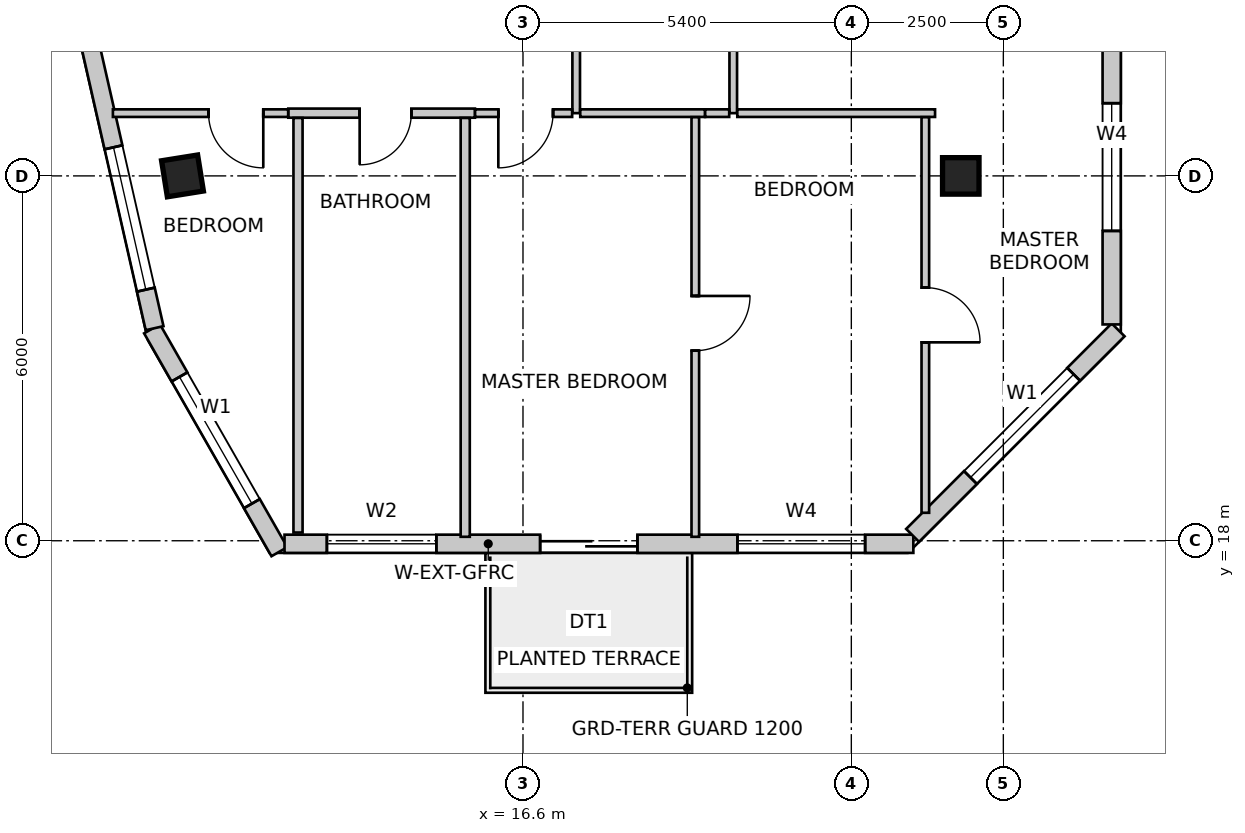
"""IFC4 building model, lengths in metres.
Left out: names, types, materials, properties, quantities, classifications, styles, units other than length and angle.
Written with IfcOpenShell. Run it as: python <this file> out.ifc"""

import sys

from ifc_helpers import new_model, si_unit, direction, frame, frame_2d, origin, origin_2d, place, context, subcontext, project, spatial, rectangle, extrude, source, transform, mapped, element, fill, save


model = new_model("IFC4")
c1 = context("Model", 3, precision=1e-05, world=origin(), true_north=direction((0.0, 1.0)))
c2 = subcontext(c1, "Body", "Model", "MODEL_VIEW")
j1 = project(units=[si_unit("LENGTHUNIT", "METRE"), si_unit("PLANEANGLEUNIT", "RADIAN")], contexts=[c1])
p1 = place(None, origin())
s1 = spatial("IfcSite", under=j1, at=p1, CompositionType="ELEMENT")
p2 = place(p1, origin())
s2 = spatial("IfcBuilding", under=s1, at=p2, CompositionType="ELEMENT")
p3 = place(p2, frame((0.0, 0.0, 256.5)))
s3 = spatial("IfcBuildingStorey", under=s2, at=p3, CompositionType="ELEMENT", Elevation=256.5)
m1 = source(origin(), c2, "Body", "SweptSolid", [
    extrude(rectangle(XDim=0.6, YDim=0.6, at=origin_2d()), origin(), (0.0, 0.0, 1.0), 3.6),
])
for number, where, z_axis, x_axis in (
    (1, (11.0, 24.0, 0.0), (0.0, 0.0, 1.0), (0.158, -0.987, 0.0)),
    (2, (23.8, 24.0, 0.0), (0.0, 0.0, 1.0), (1.0, 0.0, 0.0)),
):
    element("IfcColumn", number, at=place(p3, frame(where, z_axis=z_axis, x_axis=x_axis)), inside=s3, PredefinedType="COLUMN", context=c2, shape_type="MappedRepresentation", body=[
        mapped(m1, transform((0.0, 0.0, 0.0), scale=1.0)),
    ])
p4 = place(p3, frame((10.499, 21.485, 0.0), z_axis=(0.0, 0.0, 1.0), x_axis=(0.496163848656, -0.868228907194, 0.0)))
e3 = element("IfcWall", 3, at=p4, inside=s3, PredefinedType="SOLIDWALL", context=c2, shape_type="SweptSolid", body=[
    extrude(rectangle(XDim=4.222, YDim=0.3, at=frame_2d((2.111, 0.0))), origin(), (0.0, 0.0, 1.0), 3.35),
])
m2 = source(origin(), c2, "Body", "SweptSolid", [
    extrude(rectangle(XDim=2.4, YDim=2.2, at=frame_2d((1.2, 1.1))), frame((0.0, 0.16, 0.0), z_axis=(0.0, -1.0, 0.0), x_axis=(1.0, 0.0, 0.0)), (0.0, 0.0, 1.0), 0.32),
])
p5 = place(p4, frame((0.911, 0.0, 0.85)))
e4 = element("IfcOpeningElement", 4, at=p5, cuts=e3, PredefinedType="OPENING", context=c2, shape_type="MappedRepresentation", body=[
    mapped(m2, transform((0.0, 0.0, 0.0), scale=1.0)),
])
p6 = place(p3, frame((12.678, 17.95, 0.0), z_axis=(0.0, 0.0, 1.0), x_axis=(1.0, 0.0, 0.0)))
e5 = element("IfcWall", 5, at=p6, inside=s3, PredefinedType="SOLIDWALL", context=c2, shape_type="SweptSolid", body=[
    extrude(rectangle(XDim=10.342, YDim=0.3, at=frame_2d((5.171, 0.0))), origin(), (0.0, 0.0, 1.0), 3.35),
])
m3 = source(origin(), c2, "Body", "SweptSolid", [
    extrude(rectangle(XDim=1.6, YDim=2.15, at=frame_2d((0.8, 1.075))), frame((0.0, 0.16, 0.0), z_axis=(0.0, -1.0, 0.0), x_axis=(1.0, 0.0, 0.0)), (0.0, 0.0, 1.0), 0.32),
])
p7 = place(p6, frame((4.204, 0.0, 0.0)))
e6 = element("IfcOpeningElement", 6, at=p7, cuts=e5, PredefinedType="OPENING", context=c2, shape_type="MappedRepresentation", body=[
    mapped(m3, transform((0.0, 0.0, 0.0), scale=1.0)),
])
m4 = source(origin(), c2, "Body", "SweptSolid", [
    extrude(rectangle(XDim=1.8, YDim=2.1, at=frame_2d((0.9, 1.05))), frame((0.0, 0.16, 0.0), z_axis=(0.0, -1.0, 0.0), x_axis=(1.0, 0.0, 0.0)), (0.0, 0.0, 1.0), 0.32),
])
p8 = place(p6, frame((0.697, 0.0, 0.85)))
e7 = element("IfcOpeningElement", 7, at=p8, cuts=e5, PredefinedType="OPENING", context=c2, shape_type="MappedRepresentation", body=[
    mapped(m4, transform((0.0, 0.0, 0.0), scale=1.0)),
])
m5 = source(origin(), c2, "Body", "SweptSolid", [
    extrude(rectangle(XDim=2.1, YDim=2.0, at=frame_2d((1.05, 1.0))), frame((0.0, 0.16, 0.0), z_axis=(0.0, -1.0, 0.0), x_axis=(1.0, 0.0, 0.0)), (0.0, 0.0, 1.0), 0.32),
])
p9 = place(p6, frame((7.449, 0.0, 0.85)))
e8 = element("IfcOpeningElement", 8, at=p9, cuts=e5, PredefinedType="OPENING", context=c2, shape_type="MappedRepresentation", body=[
    mapped(m5, transform((0.0, 0.0, 0.0), scale=1.0)),
])
p10 = place(p3, frame((23.008, 18.088, 0.0), z_axis=(0.0, 0.0, 1.0), x_axis=(0.707106781187, 0.707106781187, 0.0)))
e9 = element("IfcWall", 9, at=p10, inside=s3, PredefinedType="SOLIDWALL", context=c2, shape_type="SweptSolid", body=[
    extrude(rectangle(XDim=4.781, YDim=0.3, at=frame_2d((2.39, 0.0))), origin(), (0.0, 0.0, 1.0), 3.35),
])
p11 = place(p10, frame((1.346, 0.0, 0.85)))
e10 = element("IfcOpeningElement", 10, at=p11, cuts=e9, PredefinedType="OPENING", context=c2, shape_type="MappedRepresentation", body=[
    mapped(m2, transform((0.0, 0.0, 0.0), scale=1.0)),
])
p12 = place(p3, frame((26.282, 21.557, 0.0), z_axis=(0.0, 0.0, 1.0), x_axis=(0.0, 1.0, 0.0)))
e11 = element("IfcWall", 11, at=p12, inside=s3, PredefinedType="SOLIDWALL", context=c2, shape_type="SweptSolid", body=[
    extrude(rectangle(XDim=9.711, YDim=0.3, at=frame_2d((4.855, 0.0))), origin(), (0.0, 0.0, 1.0), 3.35),
])
p13 = place(p12, frame((1.538, 0.0, 0.85)))
e12 = element("IfcOpeningElement", 12, at=p13, cuts=e11, PredefinedType="OPENING", context=c2, shape_type="MappedRepresentation", body=[
    mapped(m5, transform((0.0, 0.0, 0.0), scale=1.0)),
])
p14 = place(p12, frame((5.923, 0.0, 0.85)))
e13 = element("IfcOpeningElement", 13, at=p14, cuts=e11, PredefinedType="OPENING", context=c2, shape_type="MappedRepresentation", body=[
    mapped(m2, transform((0.0, 0.0, 0.0), scale=1.0)),
])
p15 = place(p3, frame((8.191, 31.834, 0.0), z_axis=(0.0, 0.0, 1.0), x_axis=(0.221636032737, -0.975129462683, 0.0)))
e14 = element("IfcWall", 14, at=p15, inside=s3, PredefinedType="SOLIDWALL", context=c2, shape_type="SweptSolid", body=[
    extrude(rectangle(XDim=10.602, YDim=0.3, at=frame_2d((5.301, 0.0))), origin(), (0.0, 0.0, 1.0), 3.35),
])
p16 = place(p15, frame((2.351, 0.0, 0.85)))
e15 = element("IfcOpeningElement", 15, at=p16, cuts=e14, PredefinedType="OPENING", context=c2, shape_type="MappedRepresentation", body=[
    mapped(m2, transform((0.0, 0.0, 0.0), scale=1.0)),
])
p17 = place(p15, frame((7.552, 0.0, 0.85)))
e16 = element("IfcOpeningElement", 16, at=p17, cuts=e14, PredefinedType="OPENING", context=c2, shape_type="MappedRepresentation", body=[
    mapped(m2, transform((0.0, 0.0, 0.0), scale=1.0)),
])
p18 = place(p3, frame((20.058, 25.032, 0.0), z_axis=(0.0, 0.0, 1.0), x_axis=(0.0, 1.0, 0.0)))
e17 = element("IfcWall", 17, at=p18, inside=s3, PredefinedType="PARTITIONING", context=c2, shape_type="SweptSolid", body=[
    extrude(rectangle(XDim=6.874, YDim=0.125, at=frame_2d((3.437, 0.0))), origin(), (0.0, 0.0, 1.0), 2.922),
])
m6 = source(origin(), c2, "Body", "SweptSolid", [
    extrude(rectangle(XDim=0.9, YDim=2.15, at=frame_2d((0.45, 1.075))), frame((0.0, 0.073, 0.0), z_axis=(0.0, -1.0, 0.0), x_axis=(1.0, 0.0, 0.0)), (0.0, 0.0, 1.0), 0.145),
])
p19 = place(p18, frame((2.927, 0.0, 0.0)))
e18 = element("IfcOpeningElement", 18, at=p19, cuts=e17, PredefinedType="OPENING", context=c2, shape_type="MappedRepresentation", body=[
    mapped(m6, transform((0.0, 0.0, 0.0), scale=1.0)),
])
p20 = place(p3, frame((23.377, 25.032, 0.0), z_axis=(0.0, 0.0, 1.0), x_axis=(-1.0, 0.0, 0.0)))
e19 = element("IfcWall", 19, at=p20, inside=s3, PredefinedType="PARTITIONING", context=c2, shape_type="SweptSolid", body=[
    extrude(rectangle(XDim=3.252, YDim=0.125, at=frame_2d((1.626, 0.0))), origin(), (0.0, 0.0, 1.0), 3.034),
])
p21 = place(p3, frame((17.475, 31.906, 0.0), z_axis=(0.0, 0.0, 1.0), x_axis=(0.0, -1.0, 0.0)))
e20 = element("IfcWall", 20, at=p21, inside=s3, PredefinedType="PARTITIONING", context=c2, shape_type="SweptSolid", body=[
    extrude(rectangle(XDim=6.874, YDim=0.125, at=frame_2d((3.437, 0.0))), origin(), (0.0, 0.0, 1.0), 2.922),
])
m7 = source(origin(), c2, "Body", "SweptSolid", [
    extrude(rectangle(XDim=0.85, YDim=2.15, at=frame_2d((0.425, 1.075))), frame((0.0, 0.073, 0.0), z_axis=(0.0, -1.0, 0.0), x_axis=(1.0, 0.0, 0.0)), (0.0, 0.0, 1.0), 0.145),
])
p22 = place(p21, frame((3.073, 0.0, 0.0)))
e21 = element("IfcOpeningElement", 21, at=p22, cuts=e20, PredefinedType="OPENING", context=c2, shape_type="MappedRepresentation", body=[
    mapped(m7, transform((0.0, 0.0, 0.0), scale=1.0)),
])
p23 = place(p3, frame((15.81, 25.032, 0.0), z_axis=(0.0, 0.0, 1.0), x_axis=(-1.0, 0.0, 0.0)))
e22 = element("IfcWall", 22, at=p23, inside=s3, PredefinedType="PARTITIONING", context=c2, shape_type="SweptSolid", body=[
    extrude(rectangle(XDim=3.07, YDim=0.15, at=frame_2d((1.535, 0.0))), origin(), (0.0, 0.0, 1.0), 2.922),
])
m8 = source(origin(), c2, "Body", "SweptSolid", [
    extrude(rectangle(XDim=0.85, YDim=2.15, at=frame_2d((0.425, 1.075))), frame((0.0, 0.085, 0.0), z_axis=(0.0, -1.0, 0.0), x_axis=(1.0, 0.0, 0.0)), (0.0, 0.0, 1.0), 0.17),
])
p24 = place(p23, frame((1.046, 0.0, 0.0)))
e23 = element("IfcOpeningElement", 23, at=p24, cuts=e22, PredefinedType="OPENING", context=c2, shape_type="MappedRepresentation", body=[
    mapped(m8, transform((0.0, 0.0, 0.0), scale=1.0)),
])
p25 = place(p3, frame((12.738, 25.032, 0.0), z_axis=(0.0, 0.0, 1.0), x_axis=(-1.0, 0.0, 0.0)))
e24 = element("IfcWall", 24, at=p25, inside=s3, PredefinedType="PARTITIONING", context=c2, shape_type="SweptSolid", body=[
    extrude(rectangle(XDim=2.883, YDim=0.125, at=frame_2d((1.441, 0.0))), origin(), (0.0, 0.0, 1.0), 2.642),
])
p26 = place(p25, frame((0.409, 0.0, 0.0)))
e25 = element("IfcOpeningElement", 25, at=p26, cuts=e24, PredefinedType="OPENING", context=c2, shape_type="MappedRepresentation", body=[
    mapped(m6, transform((0.0, 0.0, 0.0), scale=1.0)),
])
p27 = place(p3, frame((17.408, 25.032, 0.0), z_axis=(0.0, 0.0, 1.0), x_axis=(-1.0, 0.0, 0.0)))
e26 = element("IfcWall", 26, at=p27, inside=s3, PredefinedType="PARTITIONING", context=c2, shape_type="SweptSolid", body=[
    extrude(rectangle(XDim=1.596, YDim=0.125, at=frame_2d((0.798, 0.0))), origin(), (0.0, 0.0, 1.0), 3.35),
])
p28 = place(p27, frame((0.314, 0.0, 0.0)))
e27 = element("IfcOpeningElement", 27, at=p28, cuts=e26, PredefinedType="OPENING", context=c2, shape_type="MappedRepresentation", body=[
    mapped(m6, transform((0.0, 0.0, 0.0), scale=1.0)),
])
p29 = place(p3, frame((19.594, 25.032, 0.0), z_axis=(0.0, 0.0, 1.0), x_axis=(-1.0, 0.0, 0.0)))
e28 = element("IfcWall", 28, at=p29, inside=s3, PredefinedType="PARTITIONING", context=c2, shape_type="SweptSolid", body=[
    extrude(rectangle(XDim=2.052, YDim=0.125, at=frame_2d((1.026, 0.0))), origin(), (0.0, 0.0, 1.0), 3.35),
])
p30 = place(p3, frame((19.991, 25.032, 0.0), z_axis=(0.0, 0.0, 1.0), x_axis=(-1.0, 0.0, 0.0)))
e29 = element("IfcWall", 29, at=p30, inside=s3, PredefinedType="PARTITIONING", context=c2, shape_type="SweptSolid", body=[
    extrude(rectangle(XDim=0.396, YDim=0.125, at=frame_2d((0.198, 0.0))), origin(), (0.0, 0.0, 1.0), 3.35),
])
p31 = place(p3, frame((12.9, 18.135, 0.0), z_axis=(0.0, 0.0, 1.0), x_axis=(0.0, 1.0, 0.0)))
e30 = element("IfcWall", 30, at=p31, inside=s3, PredefinedType="PARTITIONING", context=c2, shape_type="SweptSolid", body=[
    extrude(rectangle(XDim=6.818, YDim=0.15, at=frame_2d((3.409, 0.0))), origin(), (0.0, 0.0, 1.0), 2.922),
])
p32 = place(p3, frame((15.65, 24.953, 0.0), z_axis=(0.0, 0.0, 1.0), x_axis=(0.0, -1.0, 0.0)))
e31 = element("IfcWall", 31, at=p32, inside=s3, PredefinedType="PARTITIONING", context=c2, shape_type="SweptSolid", body=[
    extrude(rectangle(XDim=6.888, YDim=0.15, at=frame_2d((3.444, 0.0))), origin(), (0.0, 0.0, 1.0), 2.979),
])
p33 = place(p3, frame((19.434, 24.966, 0.0), z_axis=(0.0, 0.0, 1.0), x_axis=(0.0, -1.0, 0.0)))
e32 = element("IfcWall", 32, at=p33, inside=s3, PredefinedType="PARTITIONING", context=c2, shape_type="SweptSolid", body=[
    extrude(rectangle(XDim=6.901, YDim=0.125, at=frame_2d((3.45, 0.0))), origin(), (0.0, 0.0, 1.0), 2.979),
])
p34 = place(p33, frame((2.94, 0.0, 0.0)))
e33 = element("IfcOpeningElement", 33, at=p34, cuts=e32, PredefinedType="OPENING", context=c2, shape_type="MappedRepresentation", body=[
    mapped(m6, transform((0.0, 0.0, 0.0), scale=1.0)),
])
p35 = place(p3, frame((23.217, 24.966, 0.0), z_axis=(0.0, 0.0, 1.0), x_axis=(0.0, -1.0, 0.0)))
e34 = element("IfcWall", 34, at=p35, inside=s3, PredefinedType="PARTITIONING", context=c2, shape_type="SweptSolid", body=[
    extrude(rectangle(XDim=6.506, YDim=0.125, at=frame_2d((3.253, 0.0))), origin(), (0.0, 0.0, 1.0), 2.979),
])
p36 = place(p35, frame((2.803, 0.0, 0.0)))
e35 = element("IfcOpeningElement", 35, at=p36, cuts=e34, PredefinedType="OPENING", context=c2, shape_type="MappedRepresentation", body=[
    mapped(m6, transform((0.0, 0.0, 0.0), scale=1.0)),
])
m9 = source(origin(), c2, "Body", "SweptSolid", [
    extrude(rectangle(XDim=2.4, YDim=2.2, at=frame_2d((1.2, 1.1))), frame((0.0, -0.015, 0.0), z_axis=(0.0, -1.0, 0.0), x_axis=(1.0, 0.0, 0.0)), (0.0, 0.0, 1.0), 0.06),
])
p37 = place(p5, origin())
e36 = element("IfcWindow", 36, at=p37, inside=s3, PartitioningType="SINGLE_PANEL", PredefinedType="WINDOW", context=c2, shape_type="MappedRepresentation", body=[
    mapped(m9, transform((0.0, 0.0, 0.0), scale=1.0)),
])
fill(e4, e36)
m10 = source(origin(), c2, "Body", "SweptSolid", [
    extrude(rectangle(XDim=1.6, YDim=2.15, at=frame_2d((0.8, 1.075))), frame((0.0, 0.025, 0.0), z_axis=(0.0, -1.0, 0.0), x_axis=(1.0, 0.0, 0.0)), (0.0, 0.0, 1.0), 0.05),
])
p38 = place(p7, origin())
e37 = element("IfcDoor", 37, at=p38, inside=s3, OperationType="DOUBLE_DOOR_SLIDING", PredefinedType="DOOR", context=c2, shape_type="MappedRepresentation", body=[
    mapped(m10, transform((0.0, 0.0, 0.0), scale=1.0)),
])
fill(e6, e37)
m11 = source(origin(), c2, "Body", "SweptSolid", [
    extrude(rectangle(XDim=1.8, YDim=2.1, at=frame_2d((0.9, 1.05))), frame((0.0, -0.015, 0.0), z_axis=(0.0, -1.0, 0.0), x_axis=(1.0, 0.0, 0.0)), (0.0, 0.0, 1.0), 0.06),
])
p39 = place(p8, origin())
e38 = element("IfcWindow", 38, at=p39, inside=s3, PartitioningType="SINGLE_PANEL", PredefinedType="WINDOW", context=c2, shape_type="MappedRepresentation", body=[
    mapped(m11, transform((0.0, 0.0, 0.0), scale=1.0)),
])
fill(e7, e38)
m12 = source(origin(), c2, "Body", "SweptSolid", [
    extrude(rectangle(XDim=2.1, YDim=2.0, at=frame_2d((1.05, 1.0))), frame((0.0, -0.015, 0.0), z_axis=(0.0, -1.0, 0.0), x_axis=(1.0, 0.0, 0.0)), (0.0, 0.0, 1.0), 0.06),
])
p40 = place(p9, origin())
e39 = element("IfcWindow", 39, at=p40, inside=s3, PartitioningType="SINGLE_PANEL", PredefinedType="WINDOW", context=c2, shape_type="MappedRepresentation", body=[
    mapped(m12, transform((0.0, 0.0, 0.0), scale=1.0)),
])
fill(e8, e39)
p41 = place(p11, origin())
e40 = element("IfcWindow", 40, at=p41, inside=s3, PartitioningType="SINGLE_PANEL", PredefinedType="WINDOW", context=c2, shape_type="MappedRepresentation", body=[
    mapped(m9, transform((0.0, 0.0, 0.0), scale=1.0)),
])
fill(e10, e40)
p42 = place(p13, origin())
e41 = element("IfcWindow", 41, at=p42, inside=s3, PartitioningType="SINGLE_PANEL", PredefinedType="WINDOW", context=c2, shape_type="MappedRepresentation", body=[
    mapped(m12, transform((0.0, 0.0, 0.0), scale=1.0)),
])
fill(e12, e41)
p43 = place(p17, origin())
e42 = element("IfcWindow", 42, at=p43, inside=s3, PartitioningType="SINGLE_PANEL", PredefinedType="WINDOW", context=c2, shape_type="MappedRepresentation", body=[
    mapped(m9, transform((0.0, 0.0, 0.0), scale=1.0)),
])
fill(e16, e42)
m13 = source(origin(), c2, "Body", "SweptSolid", [
    extrude(rectangle(XDim=0.85, YDim=2.15, at=frame_2d((0.425, 1.075))), frame((0.0, 0.025, 0.0), z_axis=(0.0, -1.0, 0.0), x_axis=(1.0, 0.0, 0.0)), (0.0, 0.0, 1.0), 0.05),
])
p44 = place(p24, origin())
e43 = element("IfcDoor", 43, at=p44, inside=s3, OperationType="SINGLE_SWING_RIGHT", PredefinedType="DOOR", context=c2, shape_type="MappedRepresentation", body=[
    mapped(m13, transform((0.0, 0.0, 0.0), scale=1.0)),
])
fill(e23, e43)
m14 = source(origin(), c2, "Body", "SweptSolid", [
    extrude(rectangle(XDim=0.9, YDim=2.15, at=frame_2d((0.45, 1.075))), frame((0.0, 0.025, 0.0), z_axis=(0.0, -1.0, 0.0), x_axis=(1.0, 0.0, 0.0)), (0.0, 0.0, 1.0), 0.05),
])
p45 = place(p26, origin())
e44 = element("IfcDoor", 44, at=p45, inside=s3, OperationType="SINGLE_SWING_LEFT", PredefinedType="DOOR", context=c2, shape_type="MappedRepresentation", body=[
    mapped(m14, transform((0.0, 0.0, 0.0), scale=1.0)),
])
fill(e25, e44)
p46 = place(p28, origin())
e45 = element("IfcDoor", 45, at=p46, inside=s3, OperationType="SINGLE_SWING_RIGHT", PredefinedType="DOOR", context=c2, shape_type="MappedRepresentation", body=[
    mapped(m14, transform((0.0, 0.0, 0.0), scale=1.0)),
])
fill(e27, e45)
p47 = place(p34, origin())
e46 = element("IfcDoor", 46, at=p47, inside=s3, OperationType="SINGLE_SWING_LEFT", PredefinedType="DOOR", context=c2, shape_type="MappedRepresentation", body=[
    mapped(m14, transform((0.0, 0.0, 0.0), scale=1.0)),
])
fill(e33, e46)
p48 = place(p36, origin())
e47 = element("IfcDoor", 47, at=p48, inside=s3, OperationType="SINGLE_SWING_RIGHT", PredefinedType="DOOR", context=c2, shape_type="MappedRepresentation", body=[
    mapped(m14, transform((0.0, 0.0, 0.0), scale=1.0)),
])
fill(e35, e47)
save(model, sys.argv[1])
